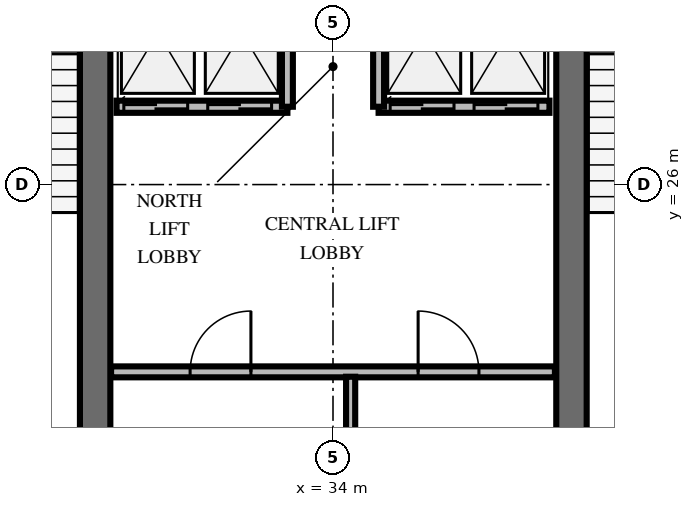
"""IFC4 building model, lengths in metres.
Left out: names, types, materials, properties, quantities, classifications, styles, units other than length and angle.
Written with IfcOpenShell. Run it as: python <this file> out.ifc"""

import sys

from ifc_helpers import new_model, si_unit, direction, frame, frame_2d, origin, place, context, subcontext, project, spatial, rectangle, extrude, element, fill, save


model = new_model("IFC4")
c1 = context("Model", 3, precision=1e-05, world=origin(), true_north=direction((0.0, 1.0)))
c2 = subcontext(c1, "Body", "Model", "MODEL_VIEW")
j1 = project(units=[si_unit("LENGTHUNIT", "METRE"), si_unit("PLANEANGLEUNIT", "RADIAN")], contexts=[c1])
p1 = place(None, origin())
s1 = spatial("IfcSite", under=j1, at=p1, CompositionType="ELEMENT")
p2 = place(p1, origin())
s2 = spatial("IfcBuilding", under=s1, at=p2, CompositionType="ELEMENT")
p3 = place(p2, frame((0.0, 0.0, 241.2)))
s3 = spatial("IfcBuildingStorey", under=s2, at=p3, CompositionType="ELEMENT", Elevation=241.2)
for number, where, z_axis, x_axis in (
    (1, (30.088, 20.262, 0.0), (0.0, 0.0, 1.0), (0.0, 1.0, 0.0)),
    (2, (37.922, 20.262, 0.0), (0.0, 0.0, 1.0), (0.0, 1.0, 0.0)),
):
    element("IfcWall", number, at=place(p3, frame(where, z_axis=z_axis, x_axis=x_axis)), inside=s3, PredefinedType="SHEAR", context=c2, shape_type="SweptSolid", body=[
        extrude(rectangle(XDim=9.676, YDim=0.5, at=frame_2d((4.838, 0.0))), origin(), (0.0, 0.0, 1.0), 3.6),
    ])
p4 = place(p3, frame((30.35, 22.92, 0.0), z_axis=(0.0, 0.0, 1.0), x_axis=(1.0, 0.0, 0.0)))
e3 = element("IfcWall", 3, at=p4, inside=s3, PredefinedType="PARTITIONING", context=c2, shape_type="SweptSolid", body=[
    extrude(rectangle(XDim=7.3, YDim=0.18, at=frame_2d((3.65, 0.0))), origin(), (0.0, 0.0, 1.0), 2.46),
])
p5 = place(p4, frame((1.3, 0.0, 0.0)))
e4 = element("IfcOpeningElement", 4, at=p5, cuts=e3, PredefinedType="OPENING", context=c2, shape_type="SweptSolid", body=[
    extrude(rectangle(XDim=1.0, YDim=2.15, at=frame_2d((0.5, 1.075))), frame((0.0, 0.1, 0.0), z_axis=(0.0, -1.0, 0.0), x_axis=(1.0, 0.0, 0.0)), (0.0, 0.0, 1.0), 0.2),
])
p6 = place(p4, frame((5.05, 0.0, 0.0)))
e5 = element("IfcOpeningElement", 5, at=p6, cuts=e3, PredefinedType="OPENING", context=c2, shape_type="SweptSolid", body=[
    extrude(rectangle(XDim=1.0, YDim=2.15, at=frame_2d((0.5, 1.075))), frame((0.0, 0.1, 0.0), z_axis=(0.0, -1.0, 0.0), x_axis=(1.0, 0.0, 0.0)), (0.0, 0.0, 1.0), 0.2),
])
p7 = place(p3, frame((34.29, 20.5, 0.0), z_axis=(0.0, 0.0, 1.0), x_axis=(0.0, 1.0, 0.0)))
e6 = element("IfcWall", 6, at=p7, inside=s3, PredefinedType="PARTITIONING", context=c2, shape_type="SweptSolid", body=[
    extrude(rectangle(XDim=2.34, YDim=0.15, at=frame_2d((1.17, 0.0))), origin(), (0.0, 0.0, 1.0), 2.46),
])
p8 = place(p3, frame((30.44, 27.28, 0.0), z_axis=(0.0, 0.0, 1.0), x_axis=(1.0, 0.0, 0.0)))
e7 = element("IfcWall", 7, at=p8, inside=s3, PredefinedType="SOLIDWALL", context=c2, shape_type="SweptSolid", body=[
    extrude(rectangle(XDim=2.81, YDim=0.2, at=frame_2d((1.405, 0.0))), origin(), (0.0, 0.0, 1.0), 2.46),
])
p9 = place(p8, frame((0.12, 0.0, 0.0)))
e8 = element("IfcOpeningElement", 8, at=p9, cuts=e7, PredefinedType="OPENING", context=c2, shape_type="SweptSolid", body=[
    extrude(rectangle(XDim=1.05, YDim=2.1, at=frame_2d((0.525, 1.05))), frame((0.0, 0.11, 0.0), z_axis=(0.0, -1.0, 0.0), x_axis=(1.0, 0.0, 0.0)), (0.0, 0.0, 1.0), 0.22),
])
p10 = place(p8, frame((1.5, 0.0, 0.0)))
e9 = element("IfcOpeningElement", 9, at=p10, cuts=e7, PredefinedType="OPENING", context=c2, shape_type="SweptSolid", body=[
    extrude(rectangle(XDim=1.05, YDim=2.1, at=frame_2d((0.525, 1.05))), frame((0.0, 0.11, 0.0), z_axis=(0.0, -1.0, 0.0), x_axis=(1.0, 0.0, 0.0)), (0.0, 0.0, 1.0), 0.22),
])
p11 = place(p3, frame((33.25, 27.28, 0.0), z_axis=(0.0, 0.0, 1.0), x_axis=(0.0, 1.0, 0.0)))
e10 = element("IfcWall", 10, at=p11, inside=s3, PredefinedType="SOLIDWALL", context=c2, shape_type="SweptSolid", body=[
    extrude(rectangle(XDim=2.47, YDim=0.18, at=frame_2d((1.235, 0.0))), origin(), (0.0, 0.0, 1.0), 2.46),
])
p12 = place(p3, frame((34.75, 27.28, 0.0), z_axis=(0.0, 0.0, 1.0), x_axis=(1.0, 0.0, 0.0)))
e11 = element("IfcWall", 11, at=p12, inside=s3, PredefinedType="SOLIDWALL", context=c2, shape_type="SweptSolid", body=[
    extrude(rectangle(XDim=2.81, YDim=0.2, at=frame_2d((1.405, 0.0))), origin(), (0.0, 0.0, 1.0), 2.46),
])
p13 = place(p12, frame((0.19, 0.0, 0.0)))
e12 = element("IfcOpeningElement", 12, at=p13, cuts=e11, PredefinedType="OPENING", context=c2, shape_type="SweptSolid", body=[
    extrude(rectangle(XDim=1.05, YDim=2.1, at=frame_2d((0.525, 1.05))), frame((0.0, 0.11, 0.0), z_axis=(0.0, -1.0, 0.0), x_axis=(1.0, 0.0, 0.0)), (0.0, 0.0, 1.0), 0.22),
])
p14 = place(p12, frame((1.57, 0.0, 0.0)))
e13 = element("IfcOpeningElement", 13, at=p14, cuts=e11, PredefinedType="OPENING", context=c2, shape_type="SweptSolid", body=[
    extrude(rectangle(XDim=1.05, YDim=2.1, at=frame_2d((0.525, 1.05))), frame((0.0, 0.11, 0.0), z_axis=(0.0, -1.0, 0.0), x_axis=(1.0, 0.0, 0.0)), (0.0, 0.0, 1.0), 0.22),
])
p15 = place(p3, frame((34.75, 27.28, 0.0), z_axis=(0.0, 0.0, 1.0), x_axis=(0.0, 1.0, 0.0)))
e14 = element("IfcWall", 14, at=p15, inside=s3, PredefinedType="SOLIDWALL", context=c2, shape_type="SweptSolid", body=[
    extrude(rectangle(XDim=2.47, YDim=0.18, at=frame_2d((1.235, 0.0))), origin(), (0.0, 0.0, 1.0), 2.46),
])
p16 = place(p5, origin())
e15 = element("IfcDoor", 15, at=p16, inside=s3, OperationType="SINGLE_SWING_RIGHT", PredefinedType="DOOR", context=c2, shape_type="SweptSolid", body=[
    extrude(rectangle(XDim=1.0, YDim=2.15, at=frame_2d((0.5, 1.075))), frame((0.0, 0.025, 0.0), z_axis=(0.0, -1.0, 0.0), x_axis=(1.0, 0.0, 0.0)), (0.0, 0.0, 1.0), 0.05),
])
fill(e4, e15)
p17 = place(p6, origin())
e16 = element("IfcDoor", 16, at=p17, inside=s3, OperationType="SINGLE_SWING_LEFT", PredefinedType="DOOR", context=c2, shape_type="SweptSolid", body=[
    extrude(rectangle(XDim=1.0, YDim=2.15, at=frame_2d((0.5, 1.075))), frame((0.0, 0.025, 0.0), z_axis=(0.0, -1.0, 0.0), x_axis=(1.0, 0.0, 0.0)), (0.0, 0.0, 1.0), 0.05),
])
fill(e5, e16)
p18 = place(p9, origin())
e17 = element("IfcDoor", 17, at=p18, inside=s3, OperationType="DOUBLE_DOOR_SLIDING", PredefinedType="USERDEFINED", context=c2, shape_type="SweptSolid", body=[
    extrude(rectangle(XDim=1.05, YDim=2.1, at=frame_2d((0.525, 1.05))), frame((0.0, 0.025, 0.0), z_axis=(0.0, -1.0, 0.0), x_axis=(1.0, 0.0, 0.0)), (0.0, 0.0, 1.0), 0.05),
])
fill(e8, e17)
p19 = place(p10, origin())
e18 = element("IfcDoor", 18, at=p19, inside=s3, OperationType="DOUBLE_DOOR_SLIDING", PredefinedType="USERDEFINED", context=c2, shape_type="SweptSolid", body=[
    extrude(rectangle(XDim=1.05, YDim=2.1, at=frame_2d((0.525, 1.05))), frame((0.0, 0.025, 0.0), z_axis=(0.0, -1.0, 0.0), x_axis=(1.0, 0.0, 0.0)), (0.0, 0.0, 1.0), 0.05),
])
fill(e9, e18)
p20 = place(p13, origin())
e19 = element("IfcDoor", 19, at=p20, inside=s3, OperationType="DOUBLE_DOOR_SLIDING", PredefinedType="USERDEFINED", context=c2, shape_type="SweptSolid", body=[
    extrude(rectangle(XDim=1.05, YDim=2.1, at=frame_2d((0.525, 1.05))), frame((0.0, 0.025, 0.0), z_axis=(0.0, -1.0, 0.0), x_axis=(1.0, 0.0, 0.0)), (0.0, 0.0, 1.0), 0.05),
])
fill(e12, e19)
p21 = place(p14, origin())
e20 = element("IfcDoor", 20, at=p21, inside=s3, OperationType="DOUBLE_DOOR_SLIDING", PredefinedType="USERDEFINED", context=c2, shape_type="SweptSolid", body=[
    extrude(rectangle(XDim=1.05, YDim=2.1, at=frame_2d((0.525, 1.05))), frame((0.0, 0.025, 0.0), z_axis=(0.0, -1.0, 0.0), x_axis=(1.0, 0.0, 0.0)), (0.0, 0.0, 1.0), 0.05),
])
fill(e13, e20)
save(model, sys.argv[1])
